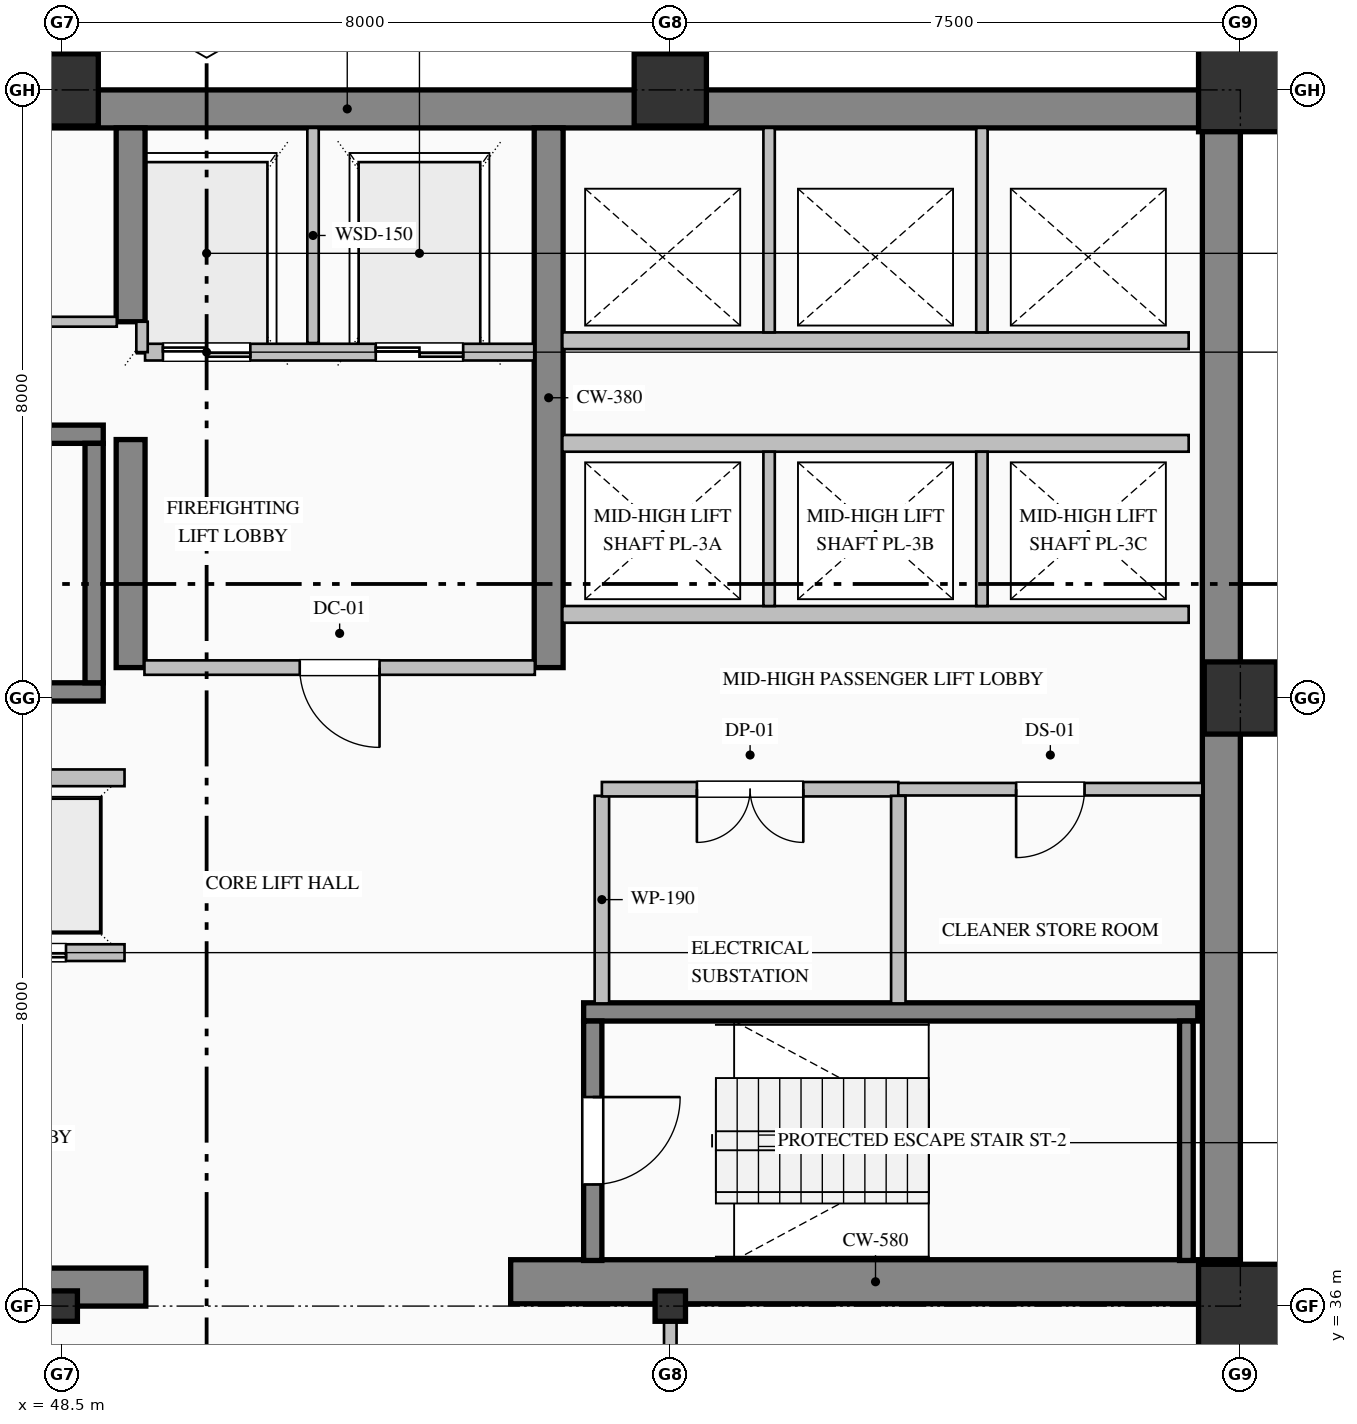
"""IFC4 building model, lengths in metres.
Left out: names, types, materials, properties, quantities, classifications, styles, units other than length and angle.
Written with IfcOpenShell. Run it as: python <this file> out.ifc"""

import sys

from ifc_helpers import new_model, si_unit, direction, frame, frame_2d, origin, origin_2d, place, context, subcontext, project, spatial, rectangle, hollow_rectangle, i_section, extrude, element, fill, save


model = new_model("IFC4")
c1 = context("Model", 3, precision=1e-05, world=origin(), true_north=direction((0.0, 1.0)))
c2 = subcontext(c1, "Body", "Model", "MODEL_VIEW")
j1 = project(units=[si_unit("LENGTHUNIT", "METRE"), si_unit("PLANEANGLEUNIT", "RADIAN")], contexts=[c1])
p1 = place(None, origin())
s1 = spatial("IfcSite", under=j1, at=p1, CompositionType="ELEMENT")
p2 = place(p1, origin())
s2 = spatial("IfcBuilding", under=s1, at=p2, CompositionType="ELEMENT")
p3 = place(p2, frame((0.0, 0.0, 183.0)))
s3 = spatial("IfcBuildingStorey", under=s2, at=p3, CompositionType="ELEMENT", Elevation=183.0)
p4 = place(p3, frame((40.5, 51.75, 0.0), z_axis=(0.0, 0.0, 1.0), x_axis=(1.0, 0.0, 0.0)))
e1 = element("IfcWall", 1, at=p4, inside=s3, PredefinedType="SHEAR", context=c2, shape_type="SweptSolid", body=[
    extrude(rectangle(XDim=23.5, YDim=0.5, at=frame_2d((11.75, 0.0))), origin(), (0.0, 0.0, 1.0), 3.765),
])
p5 = place(p3, frame((63.75, 36.32, 0.0), z_axis=(0.0, 0.0, 1.0), x_axis=(0.0, 1.0, 0.0)))
e2 = element("IfcWall", 2, at=p5, inside=s3, PredefinedType="SHEAR", context=c2, shape_type="SweptSolid", body=[
    extrude(rectangle(XDim=15.18, YDim=0.5, at=frame_2d((7.59, 0.0))), origin(), (0.0, 0.0, 1.0), 3.765),
])
p6 = place(p3, frame((40.5, 36.25, 0.0), z_axis=(0.0, 0.0, 1.0), x_axis=(1.0, 0.0, 0.0)))
e3 = element("IfcWall", 3, at=p6, inside=s3, PredefinedType="SHEAR", context=c2, shape_type="SweptSolid", body=[
    extrude(rectangle(XDim=9.1, YDim=0.5, at=frame_2d((4.55, 0.0))), origin(), (0.0, 0.0, 1.0), 3.765),
])
p7 = place(p3, frame((54.4, 36.32, 0.0), z_axis=(0.0, 0.0, 1.0), x_axis=(1.0, 0.0, 0.0)))
e4 = element("IfcWall", 4, at=p7, inside=s3, PredefinedType="SHEAR", context=c2, shape_type="SweptSolid", body=[
    extrude(rectangle(XDim=9.6, YDim=0.58, at=frame_2d((4.8, 0.0))), origin(), (0.0, 0.0, 1.0), 4.0),
])
p8 = place(p3, frame((49.4, 44.4, 0.0), z_axis=(0.0, 0.0, 1.0), x_axis=(0.0, 1.0, 0.0)))
e5 = element("IfcWall", 5, at=p8, inside=s3, PredefinedType="SHEAR", context=c2, shape_type="SweptSolid", body=[
    extrude(rectangle(XDim=3.0, YDim=0.38, at=frame_2d((1.5, 0.0))), origin(), (0.0, 0.0, 1.0), 3.765),
])
p9 = place(p3, frame((49.4, 48.95, 0.0), z_axis=(0.0, 0.0, 1.0), x_axis=(0.0, 1.0, 0.0)))
e6 = element("IfcWall", 6, at=p9, inside=s3, PredefinedType="SHEAR", context=c2, shape_type="SweptSolid", body=[
    extrude(rectangle(XDim=2.55, YDim=0.38, at=frame_2d((1.275, 0.0))), origin(), (0.0, 0.0, 1.0), 3.765),
])
p10 = place(p3, frame((54.9, 44.4, 0.0), z_axis=(0.0, 0.0, 1.0), x_axis=(0.0, 1.0, 0.0)))
e7 = element("IfcWall", 7, at=p10, inside=s3, PredefinedType="SHEAR", context=c2, shape_type="SweptSolid", body=[
    extrude(rectangle(XDim=7.1, YDim=0.38, at=frame_2d((3.55, 0.0))), origin(), (0.0, 0.0, 1.0), 3.765),
])
p11 = place(p3, frame((48.5, 36.0, 0.0), z_axis=(0.0, 0.0, 1.0), x_axis=(1.0, 0.0, 0.0)))
e8 = element("IfcColumn", 8, at=p11, inside=s3, PredefinedType="COLUMN", context=c2, shape_type="SweptSolid", body=[
    extrude(i_section(OverallWidth=0.4, OverallDepth=0.4, WebThickness=0.013, FlangeThickness=0.021, FilletRadius=0.022, at=origin_2d()), origin(), (0.0, 0.0, 1.0), 4.0),
])
p12 = place(p3, frame((48.5, 52.0, 0.0), z_axis=(0.0, 0.0, 1.0), x_axis=(1.0, 0.0, 0.0)))
e9 = element("IfcColumn", 9, at=p12, inside=s3, PredefinedType="COLUMN", context=c2, shape_type="SweptSolid", body=[
    extrude(hollow_rectangle(XDim=0.95, YDim=0.95, WallThickness=0.036, at=origin_2d()), origin(), (0.0, 0.0, 1.0), 4.0),
])
p13 = place(p3, frame((56.5, 36.0, 0.0), z_axis=(0.0, 0.0, 1.0), x_axis=(1.0, 0.0, 0.0)))
e10 = element("IfcColumn", 10, at=p13, inside=s3, PredefinedType="COLUMN", context=c2, shape_type="SweptSolid", body=[
    extrude(i_section(OverallWidth=0.4, OverallDepth=0.4, WebThickness=0.013, FlangeThickness=0.021, FilletRadius=0.022, at=origin_2d()), origin(), (0.0, 0.0, 1.0), 4.0),
])
p14 = place(p3, frame((56.5, 52.0, 0.0), z_axis=(0.0, 0.0, 1.0), x_axis=(1.0, 0.0, 0.0)))
e11 = element("IfcColumn", 11, at=p14, inside=s3, PredefinedType="COLUMN", context=c2, shape_type="SweptSolid", body=[
    extrude(hollow_rectangle(XDim=0.95, YDim=0.95, WallThickness=0.036, at=origin_2d()), origin(), (0.0, 0.0, 1.0), 4.0),
])
p15 = place(p3, frame((64.0, 36.0, 0.0), z_axis=(0.0, 0.0, 1.0), x_axis=(1.0, 0.0, 0.0)))
e12 = element("IfcColumn", 12, at=p15, inside=s3, PredefinedType="COLUMN", context=c2, shape_type="SweptSolid", body=[
    extrude(hollow_rectangle(XDim=1.1, YDim=1.1, WallThickness=0.04, at=origin_2d()), origin(), (0.0, 0.0, 1.0), 4.0),
])
p16 = place(p3, frame((64.0, 44.0, 0.0), z_axis=(0.0, 0.0, 1.0), x_axis=(1.0, 0.0, 0.0)))
e13 = element("IfcColumn", 13, at=p16, inside=s3, PredefinedType="COLUMN", context=c2, shape_type="SweptSolid", body=[
    extrude(hollow_rectangle(XDim=0.95, YDim=0.95, WallThickness=0.036, at=origin_2d()), origin(), (0.0, 0.0, 1.0), 4.0),
])
p17 = place(p3, frame((64.0, 52.0, 0.0), z_axis=(0.0, 0.0, 1.0), x_axis=(1.0, 0.0, 0.0)))
e14 = element("IfcColumn", 14, at=p17, inside=s3, PredefinedType="COLUMN", context=c2, shape_type="SweptSolid", body=[
    extrude(hollow_rectangle(XDim=1.1, YDim=1.1, WallThickness=0.04, at=origin_2d()), origin(), (0.0, 0.0, 1.0), 4.0),
])
p18 = place(p3, frame((63.82, 36.05, 0.0), z_axis=(0.0, 0.0, 1.0), x_axis=(0.0, -1.0, 0.0)))
e15 = element("IfcWall", 15, at=p18, inside=s3, PredefinedType="SOLIDWALL", context=c2, shape_type="SweptSolid", body=[
    extrude(rectangle(XDim=28.05, YDim=0.36, at=frame_2d((14.025, 0.0))), origin(), (0.0, 0.0, 1.0), 3.265),
])
p19 = place(p18, frame((3.0, 0.0, 0.7)))
e16 = element("IfcOpeningElement", 16, at=p19, cuts=e15, PredefinedType="OPENING", context=c2, shape_type="SweptSolid", body=[
    extrude(rectangle(XDim=1.2, YDim=1.85, at=frame_2d((0.6, 0.925))), frame((0.0, 0.19, 0.0), z_axis=(0.0, -1.0, 0.0), x_axis=(1.0, 0.0, 0.0)), (0.0, 0.0, 1.0), 0.38),
])
p20 = place(p18, frame((13.8, 0.0, 0.7)))
e17 = element("IfcOpeningElement", 17, at=p20, cuts=e15, PredefinedType="OPENING", context=c2, shape_type="SweptSolid", body=[
    extrude(rectangle(XDim=1.2, YDim=1.85, at=frame_2d((0.6, 0.925))), frame((0.0, 0.19, 0.0), z_axis=(0.0, -1.0, 0.0), x_axis=(1.0, 0.0, 0.0)), (0.0, 0.0, 1.0), 0.38),
])
p21 = place(p18, frame((24.6, 0.0, 0.7)))
e18 = element("IfcOpeningElement", 18, at=p21, cuts=e15, PredefinedType="OPENING", context=c2, shape_type="SweptSolid", body=[
    extrude(rectangle(XDim=1.2, YDim=1.85, at=frame_2d((0.6, 0.925))), frame((0.0, 0.19, 0.0), z_axis=(0.0, -1.0, 0.0), x_axis=(1.0, 0.0, 0.0)), (0.0, 0.0, 1.0), 0.38),
])
for number, where, z_axis, x_axis in (
    (19, (40.96, 47.47, 0.0), (0.0, 0.0, 1.0), (1.0, 0.0, 0.0)),
    (20, (49.04, 44.08, 0.0), (0.0, 0.0, 1.0), (-1.0, 0.0, 0.0)),
):
    element("IfcWall", number, at=place(p3, frame(where, z_axis=z_axis, x_axis=x_axis)), inside=s3, PredefinedType="SOLIDWALL", context=c2, shape_type="SweptSolid", body=[
        extrude(rectangle(XDim=8.08, YDim=0.24, at=frame_2d((4.04, 0.0))), origin(), (0.0, 0.0, 1.0), 4.0),
    ])
p22 = place(p3, frame((48.92, 44.2, 0.0), z_axis=(0.0, 0.0, 1.0), x_axis=(0.0, 1.0, 0.0)))
e21 = element("IfcWall", 21, at=p22, inside=s3, PredefinedType="SOLIDWALL", context=c2, shape_type="SweptSolid", body=[
    extrude(rectangle(XDim=3.15, YDim=0.24, at=frame_2d((1.575, 0.0))), origin(), (0.0, 0.0, 1.0), 4.0),
])
p23 = place(p3, frame((55.36, 39.87, 0.0), z_axis=(0.0, 0.0, 1.0), x_axis=(1.0, 0.0, 0.0)))
e22 = element("IfcWall", 22, at=p23, inside=s3, PredefinedType="SOLIDWALL", context=c2, shape_type="SweptSolid", body=[
    extrude(rectangle(XDim=8.08, YDim=0.24, at=frame_2d((4.04, 0.0))), origin(), (0.0, 0.0, 1.0), 4.0),
])
p24 = place(p3, frame((55.48, 39.75, 0.0), z_axis=(0.0, 0.0, 1.0), x_axis=(0.0, -1.0, 0.0)))
e23 = element("IfcWall", 23, at=p24, inside=s3, PredefinedType="SOLIDWALL", context=c2, shape_type="SweptSolid", body=[
    extrude(rectangle(XDim=3.15, YDim=0.24, at=frame_2d((1.575, 0.0))), origin(), (0.0, 0.0, 1.0), 4.0),
])
p25 = place(p24, frame((1.0, 0.0, 0.0)))
e24 = element("IfcOpeningElement", 24, at=p25, cuts=e23, PredefinedType="OPENING", context=c2, shape_type="SweptSolid", body=[
    extrude(rectangle(XDim=1.15, YDim=2.2, at=frame_2d((0.575, 1.1))), frame((0.0, 0.13, 0.0), z_axis=(0.0, -1.0, 0.0), x_axis=(1.0, 0.0, 0.0)), (0.0, 0.0, 1.0), 0.26),
])
p26 = place(p3, frame((63.29, 36.6, 0.0), z_axis=(0.0, 0.0, 1.0), x_axis=(0.0, 1.0, 0.0)))
e25 = element("IfcWall", 25, at=p26, inside=s3, PredefinedType="SOLIDWALL", context=c2, shape_type="SweptSolid", body=[
    extrude(rectangle(XDim=3.15, YDim=0.18, at=frame_2d((1.575, 0.0))), origin(), (0.0, 0.0, 1.0), 4.0),
])
p27 = place(p3, frame((54.71, 48.55, 0.0), z_axis=(0.0, 0.0, 1.0), x_axis=(-1.0, 0.0, 0.0)))
e26 = element("IfcWall", 26, at=p27, inside=s3, PredefinedType="PARTITIONING", context=c2, shape_type="SweptSolid", body=[
    extrude(rectangle(XDim=5.12, YDim=0.22, at=frame_2d((2.56, 0.0))), origin(), (0.0, 0.0, 1.0), 3.765),
])
p28 = place(p27, frame((3.735, 0.0, 0.0)))
e27 = element("IfcOpeningElement", 27, at=p28, cuts=e26, PredefinedType="OPENING", context=c2, shape_type="SweptSolid", body=[
    extrude(rectangle(XDim=1.15, YDim=2.2, at=frame_2d((0.575, 1.1))), frame((0.0, 0.12, 0.0), z_axis=(0.0, -1.0, 0.0), x_axis=(1.0, 0.0, 0.0)), (0.0, 0.0, 1.0), 0.24),
])
p29 = place(p27, frame((0.935, 0.0, 0.0)))
e28 = element("IfcOpeningElement", 28, at=p29, cuts=e26, PredefinedType="OPENING", context=c2, shape_type="SweptSolid", body=[
    extrude(rectangle(XDim=1.15, YDim=2.2, at=frame_2d((0.575, 1.1))), frame((0.0, 0.12, 0.0), z_axis=(0.0, -1.0, 0.0), x_axis=(1.0, 0.0, 0.0)), (0.0, 0.0, 1.0), 0.24),
])
p30 = place(p3, frame((51.8, 48.67, 0.0), z_axis=(0.0, 0.0, 1.0), x_axis=(0.0, 1.0, 0.0)))
e29 = element("IfcWall", 29, at=p30, inside=s3, PredefinedType="PARTITIONING", context=c2, shape_type="SweptSolid", body=[
    extrude(rectangle(XDim=2.83, YDim=0.15, at=frame_2d((1.415, 0.0))), origin(), (0.0, 0.0, 1.0), 3.765),
])
p31 = place(p3, frame((49.55, 48.55, 0.0), z_axis=(0.0, 0.0, 1.0), x_axis=(0.0, 1.0, 0.0)))
e30 = element("IfcWall", 30, at=p31, inside=s3, PredefinedType="PARTITIONING", context=c2, shape_type="SweptSolid", body=[
    extrude(rectangle(XDim=0.4, YDim=0.15, at=frame_2d((0.2, 0.0))), origin(), (0.0, 0.0, 1.0), 3.765),
])
p32 = place(p3, frame((49.32, 40.65, 0.0), z_axis=(0.0, 0.0, 1.0), x_axis=(-1.0, 0.0, 0.0)))
e31 = element("IfcWall", 31, at=p32, inside=s3, PredefinedType="PARTITIONING", context=c2, shape_type="SweptSolid", body=[
    extrude(rectangle(XDim=8.24, YDim=0.22, at=frame_2d((4.12, 0.0))), origin(), (0.0, 0.0, 1.0), 3.765),
])
p33 = place(p32, frame((6.37, 0.0, 0.0)))
e32 = element("IfcOpeningElement", 32, at=p33, cuts=e31, PredefinedType="OPENING", context=c2, shape_type="SweptSolid", body=[
    extrude(rectangle(XDim=1.1, YDim=2.2, at=frame_2d((0.55, 1.1))), frame((0.0, 0.12, 0.0), z_axis=(0.0, -1.0, 0.0), x_axis=(1.0, 0.0, 0.0)), (0.0, 0.0, 1.0), 0.24),
])
p34 = place(p32, frame((3.57, 0.0, 0.0)))
e33 = element("IfcOpeningElement", 33, at=p34, cuts=e31, PredefinedType="OPENING", context=c2, shape_type="SweptSolid", body=[
    extrude(rectangle(XDim=1.1, YDim=2.2, at=frame_2d((0.55, 1.1))), frame((0.0, 0.12, 0.0), z_axis=(0.0, -1.0, 0.0), x_axis=(1.0, 0.0, 0.0)), (0.0, 0.0, 1.0), 0.24),
])
p35 = place(p32, frame((0.77, 0.0, 0.0)))
e34 = element("IfcOpeningElement", 34, at=p35, cuts=e31, PredefinedType="OPENING", context=c2, shape_type="SweptSolid", body=[
    extrude(rectangle(XDim=1.1, YDim=2.2, at=frame_2d((0.55, 1.1))), frame((0.0, 0.12, 0.0), z_axis=(0.0, -1.0, 0.0), x_axis=(1.0, 0.0, 0.0)), (0.0, 0.0, 1.0), 0.24),
])
for number, where, z_axis, x_axis in (
    (35, (41.08, 42.95, 0.0), (0.0, 0.0, 1.0), (1.0, 0.0, 0.0)),
    (36, (63.32, 45.1, 0.0), (0.0, 0.0, 1.0), (-1.0, 0.0, 0.0)),
    (37, (55.08, 47.35, 0.0), (0.0, 0.0, 1.0), (1.0, 0.0, 0.0)),
):
    element("IfcWall", number, at=place(p3, frame(where, z_axis=z_axis, x_axis=x_axis)), inside=s3, PredefinedType="PARTITIONING", context=c2, shape_type="SweptSolid", body=[
        extrude(rectangle(XDim=8.24, YDim=0.22, at=frame_2d((4.12, 0.0))), origin(), (0.0, 0.0, 1.0), 3.765),
    ])
for number, where, z_axis, x_axis in (
    (38, (57.8, 45.21, 0.0), (0.0, 0.0, 1.0), (0.0, 1.0, 0.0)),
    (39, (60.6, 45.21, 0.0), (0.0, 0.0, 1.0), (0.0, 1.0, 0.0)),
):
    element("IfcWall", number, at=place(p3, frame(where, z_axis=z_axis, x_axis=x_axis)), inside=s3, PredefinedType="PARTITIONING", context=c2, shape_type="SweptSolid", body=[
        extrude(rectangle(XDim=2.03, YDim=0.15, at=frame_2d((1.015, 0.0))), origin(), (0.0, 0.0, 1.0), 3.765),
    ])
p36 = place(p3, frame((63.32, 48.7, 0.0), z_axis=(0.0, 0.0, 1.0), x_axis=(-1.0, 0.0, 0.0)))
e40 = element("IfcWall", 40, at=p36, inside=s3, PredefinedType="PARTITIONING", context=c2, shape_type="SweptSolid", body=[
    extrude(rectangle(XDim=8.24, YDim=0.22, at=frame_2d((4.12, 0.0))), origin(), (0.0, 0.0, 1.0), 3.765),
])
for number, where, z_axis, x_axis in (
    (41, (57.8, 48.81, 0.0), (0.0, 0.0, 1.0), (0.0, 1.0, 0.0)),
    (42, (60.6, 48.81, 0.0), (0.0, 0.0, 1.0), (0.0, 1.0, 0.0)),
):
    element("IfcWall", number, at=place(p3, frame(where, z_axis=z_axis, x_axis=x_axis)), inside=s3, PredefinedType="PARTITIONING", context=c2, shape_type="SweptSolid", body=[
        extrude(rectangle(XDim=2.69, YDim=0.15, at=frame_2d((1.345, 0.0))), origin(), (0.0, 0.0, 1.0), 3.765),
    ])
p37 = place(p3, frame((45.2, 48.95, 0.0), z_axis=(0.0, 0.0, 1.0), x_axis=(1.0, 0.0, 0.0)))
e43 = element("IfcWall", 43, at=p37, inside=s3, PredefinedType="PARTITIONING", context=c2, shape_type="SweptSolid", body=[
    extrude(rectangle(XDim=4.018, YDim=0.13, at=frame_2d((2.009, 0.0))), origin(), (0.0, 0.0, 1.0), 3.765),
])
p38 = place(p37, frame((1.549, 0.0, 0.0)))
e44 = element("IfcOpeningElement", 44, at=p38, cuts=e43, PredefinedType="OPENING", context=c2, shape_type="SweptSolid", body=[
    extrude(rectangle(XDim=0.92, YDim=2.15, at=frame_2d((0.46, 1.075))), frame((0.0, 0.075, 0.0), z_axis=(0.0, -1.0, 0.0), x_axis=(1.0, 0.0, 0.0)), (0.0, 0.0, 1.0), 0.15),
])
p39 = place(p3, frame((54.718, 44.4, 0.0), z_axis=(0.0, 0.0, 1.0), x_axis=(-1.0, 0.0, 0.0)))
e45 = element("IfcWall", 45, at=p39, inside=s3, PredefinedType="PARTITIONING", context=c2, shape_type="SweptSolid", body=[
    extrude(rectangle(XDim=5.136, YDim=0.19, at=frame_2d((2.568, 0.0))), origin(), (0.0, 0.0, 1.0), 3.765),
])
p40 = place(p39, frame((2.043, 0.0, 0.0)))
e46 = element("IfcOpeningElement", 46, at=p40, cuts=e45, PredefinedType="OPENING", context=c2, shape_type="SweptSolid", body=[
    extrude(rectangle(XDim=1.05, YDim=2.15, at=frame_2d((0.525, 1.075))), frame((0.0, 0.105, 0.0), z_axis=(0.0, -1.0, 0.0), x_axis=(1.0, 0.0, 0.0)), (0.0, 0.0, 1.0), 0.21),
])
p41 = place(p3, frame((55.6, 42.713, 0.0), z_axis=(0.0, 0.0, 1.0), x_axis=(0.0, -1.0, 0.0)))
e47 = element("IfcWall", 47, at=p41, inside=s3, PredefinedType="PARTITIONING", context=c2, shape_type="SweptSolid", body=[
    extrude(rectangle(XDim=2.731, YDim=0.19, at=frame_2d((1.365, 0.0))), origin(), (0.0, 0.0, 1.0), 3.765),
])
p42 = place(p3, frame((59.5, 42.8, 0.0), z_axis=(0.0, 0.0, 1.0), x_axis=(-1.0, 0.0, 0.0)))
e48 = element("IfcWall", 48, at=p42, inside=s3, PredefinedType="PARTITIONING", context=c2, shape_type="SweptSolid", body=[
    extrude(rectangle(XDim=3.9, YDim=0.19, at=frame_2d((1.95, 0.0))), origin(), (0.0, 0.0, 1.0), 3.765),
])
p43 = place(p42, frame((1.25, 0.0, 0.0)))
e49 = element("IfcOpeningElement", 49, at=p43, cuts=e48, PredefinedType="OPENING", context=c2, shape_type="SweptSolid", body=[
    extrude(rectangle(XDim=1.4, YDim=2.25, at=frame_2d((0.7, 1.125))), frame((0.0, 0.105, 0.0), z_axis=(0.0, -1.0, 0.0), x_axis=(1.0, 0.0, 0.0)), (0.0, 0.0, 1.0), 0.21),
])
p44 = place(p3, frame((63.5, 42.8, 0.0), z_axis=(0.0, 0.0, 1.0), x_axis=(-1.0, 0.0, 0.0)))
e50 = element("IfcWall", 50, at=p44, inside=s3, PredefinedType="PARTITIONING", context=c2, shape_type="SweptSolid", body=[
    extrude(rectangle(XDim=4.0, YDim=0.165, at=frame_2d((2.0, 0.0))), origin(), (0.0, 0.0, 1.0), 3.765),
])
p45 = place(p44, frame((1.55, 0.0, 0.0)))
e51 = element("IfcOpeningElement", 51, at=p45, cuts=e50, PredefinedType="OPENING", context=c2, shape_type="SweptSolid", body=[
    extrude(rectangle(XDim=0.9, YDim=2.15, at=frame_2d((0.45, 1.075))), frame((0.0, 0.093, 0.0), z_axis=(0.0, -1.0, 0.0), x_axis=(1.0, 0.0, 0.0)), (0.0, 0.0, 1.0), 0.185),
])
p46 = place(p3, frame((59.5, 42.713, 0.0), z_axis=(0.0, 0.0, 1.0), x_axis=(0.0, -1.0, 0.0)))
e52 = element("IfcWall", 52, at=p46, inside=s3, PredefinedType="PARTITIONING", context=c2, shape_type="SweptSolid", body=[
    extrude(rectangle(XDim=2.731, YDim=0.19, at=frame_2d((1.365, 0.0))), origin(), (0.0, 0.0, 1.0), 3.765),
])
p47 = place(p3, frame((56.5, 36.0, 0.0), z_axis=(0.0, 0.0, 1.0), x_axis=(0.0, -1.0, 0.0)))
e53 = element("IfcWall", 53, at=p47, inside=s3, PredefinedType="PARTITIONING", context=c2, shape_type="SweptSolid", body=[
    extrude(rectangle(XDim=2.325, YDim=0.165, at=frame_2d((1.163, 0.0))), origin(), (0.0, 0.0, 1.0), 3.157),
])
p48 = place(p25, origin())
e54 = element("IfcDoor", 54, at=p48, inside=s3, OperationType="SINGLE_SWING_LEFT", PredefinedType="DOOR", context=c2, shape_type="SweptSolid", body=[
    extrude(rectangle(XDim=1.15, YDim=2.2, at=frame_2d((0.575, 1.1))), frame((0.0, 0.025, 0.0), z_axis=(0.0, -1.0, 0.0), x_axis=(1.0, 0.0, 0.0)), (0.0, 0.0, 1.0), 0.05),
])
fill(e24, e54)
p49 = place(p28, origin())
e55 = element("IfcDoor", 55, at=p49, inside=s3, OperationType="DOUBLE_DOOR_SLIDING", PredefinedType="DOOR", context=c2, shape_type="SweptSolid", body=[
    extrude(rectangle(XDim=1.15, YDim=2.2, at=frame_2d((0.575, 1.1))), frame((0.0, 0.025, 0.0), z_axis=(0.0, -1.0, 0.0), x_axis=(1.0, 0.0, 0.0)), (0.0, 0.0, 1.0), 0.05),
])
fill(e27, e55)
p50 = place(p29, origin())
e56 = element("IfcDoor", 56, at=p50, inside=s3, OperationType="DOUBLE_DOOR_SLIDING", PredefinedType="DOOR", context=c2, shape_type="SweptSolid", body=[
    extrude(rectangle(XDim=1.15, YDim=2.2, at=frame_2d((0.575, 1.1))), frame((0.0, 0.025, 0.0), z_axis=(0.0, -1.0, 0.0), x_axis=(1.0, 0.0, 0.0)), (0.0, 0.0, 1.0), 0.05),
])
fill(e28, e56)
p51 = place(p35, origin())
e57 = element("IfcDoor", 57, at=p51, inside=s3, OperationType="DOUBLE_DOOR_SLIDING", PredefinedType="DOOR", context=c2, shape_type="SweptSolid", body=[
    extrude(rectangle(XDim=1.1, YDim=2.2, at=frame_2d((0.55, 1.1))), frame((0.0, 0.025, 0.0), z_axis=(0.0, -1.0, 0.0), x_axis=(1.0, 0.0, 0.0)), (0.0, 0.0, 1.0), 0.05),
])
fill(e34, e57)
p52 = place(p40, origin())
e58 = element("IfcDoor", 58, at=p52, inside=s3, OperationType="SINGLE_SWING_LEFT", PredefinedType="DOOR", context=c2, shape_type="SweptSolid", body=[
    extrude(rectangle(XDim=1.05, YDim=2.15, at=frame_2d((0.525, 1.075))), frame((0.0, 0.025, 0.0), z_axis=(0.0, -1.0, 0.0), x_axis=(1.0, 0.0, 0.0)), (0.0, 0.0, 1.0), 0.05),
])
fill(e46, e58)
p53 = place(p43, origin())
e59 = element("IfcDoor", 59, at=p53, inside=s3, OperationType="DOUBLE_DOOR_SINGLE_SWING", PredefinedType="DOOR", context=c2, shape_type="SweptSolid", body=[
    extrude(rectangle(XDim=1.4, YDim=2.25, at=frame_2d((0.7, 1.125))), frame((0.0, 0.025, 0.0), z_axis=(0.0, -1.0, 0.0), x_axis=(1.0, 0.0, 0.0)), (0.0, 0.0, 1.0), 0.05),
])
fill(e49, e59)
p54 = place(p45, origin())
e60 = element("IfcDoor", 60, at=p54, inside=s3, OperationType="SINGLE_SWING_RIGHT", PredefinedType="DOOR", context=c2, shape_type="SweptSolid", body=[
    extrude(rectangle(XDim=0.9, YDim=2.15, at=frame_2d((0.45, 1.075))), frame((0.0, 0.025, 0.0), z_axis=(0.0, -1.0, 0.0), x_axis=(1.0, 0.0, 0.0)), (0.0, 0.0, 1.0), 0.05),
])
fill(e51, e60)
save(model, sys.argv[1])
